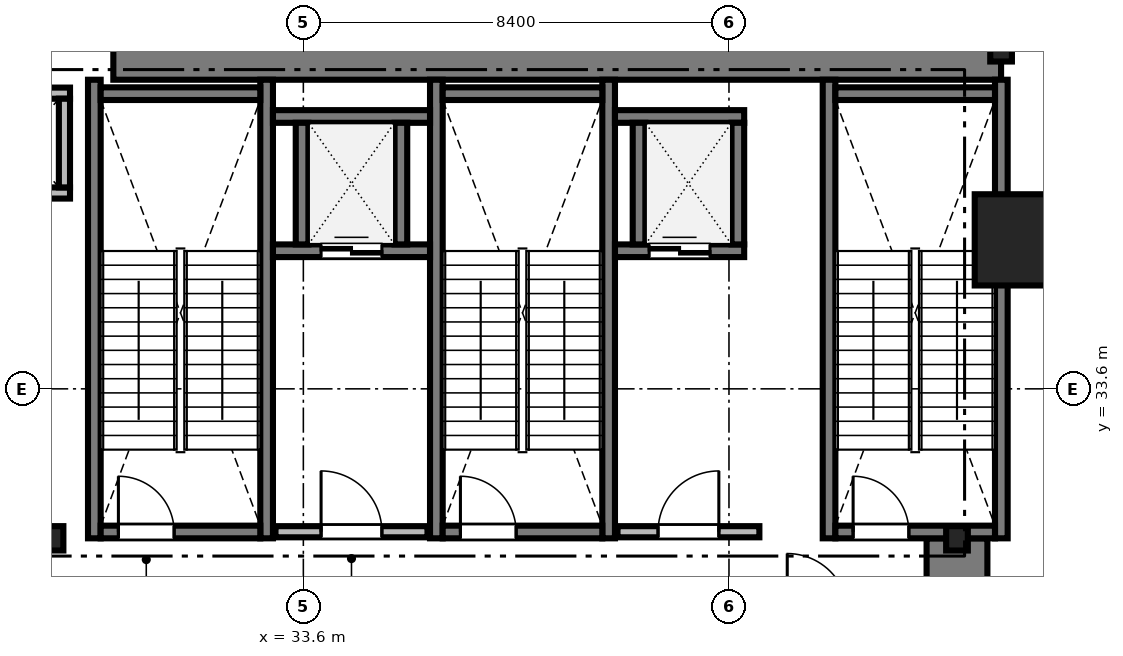
"""IFC4 building model, lengths in metres.
Left out: names, types, materials, properties, quantities, classifications, styles, units other than length and angle.
Written with IfcOpenShell. Run it as: python <this file> out.ifc"""

import sys

from ifc_helpers import new_model, si_unit, direction, frame, frame_2d, origin, origin_2d, place, context, subcontext, project, spatial, rectangle, i_section, extrude, source, transform, mapped, element, fill, save


model = new_model("IFC4")
c1 = context("Model", 3, precision=1e-05, world=origin(), true_north=direction((0.0, 1.0)))
c2 = subcontext(c1, "Body", "Model", "MODEL_VIEW")
j1 = project(units=[si_unit("LENGTHUNIT", "METRE"), si_unit("PLANEANGLEUNIT", "RADIAN")], contexts=[c1])
p1 = place(None, origin())
s1 = spatial("IfcSite", under=j1, at=p1, CompositionType="ELEMENT")
p2 = place(p1, origin())
s2 = spatial("IfcBuilding", under=s1, at=p2, CompositionType="ELEMENT")
p3 = place(p2, frame((0.0, 0.0, 17.0)))
s3 = spatial("IfcBuildingStorey", under=s2, at=p3, CompositionType="ELEMENT", Elevation=17.0)
m1 = source(origin(), c2, "Body", "SweptSolid", [
    extrude(rectangle(XDim=17.52, YDim=1.2, at=frame_2d((8.76, 0.0))), origin(), (0.0, 0.0, 1.0), 5.08),
])
p4 = place(p3, frame((29.85, 40.3, 0.0), z_axis=(0.0, 0.0, 1.0), x_axis=(1.0, 0.0, 0.0)))
e1 = element("IfcWall", 1, at=p4, inside=s3, PredefinedType="SHEAR", context=c2, shape_type="MappedRepresentation", body=[
    mapped(m1, transform((0.0, 0.0, 0.0), scale=1.0)),
])
m2 = source(origin(), c2, "Body", "SweptSolid", [
    extrude(rectangle(XDim=13.15, YDim=1.2, at=frame_2d((6.575, 0.0))), origin(), (0.0, 0.0, 1.0), 5.08),
])
p5 = place(p3, frame((46.5, 17.5, 0.0), z_axis=(0.0, 0.0, 1.0), x_axis=(0.0, 1.0, 0.0)))
e2 = element("IfcWall", 2, at=p5, inside=s3, PredefinedType="SHEAR", context=c2, shape_type="MappedRepresentation", body=[
    mapped(m2, transform((0.0, 0.0, 0.0), scale=1.0)),
])
m3 = source(origin(), c2, "Body", "SweptSolid", [
    extrude(i_section(OverallWidth=0.428, OverallDepth=0.481, WebThickness=0.04, FlangeThickness=0.063, FilletRadius=0.015, at=origin_2d()), origin(), (0.0, 0.0, 1.0), 5.08),
])
for number, where, z_axis, x_axis in (
    (3, (28.65, 30.65, 0.0), (0.0, 0.0, 1.0), (1.0, 0.0, 0.0)),
    (4, (46.5, 30.65, 0.0), (0.0, 0.0, 1.0), (1.0, 0.0, 0.0)),
    (5, (47.37, 40.3, 0.0), (0.0, 0.0, 1.0), (1.0, 0.0, 0.0)),
):
    element("IfcColumn", number, at=place(p3, frame(where, z_axis=z_axis, x_axis=x_axis)), inside=s3, PredefinedType="COLUMN", context=c2, shape_type="MappedRepresentation", body=[
        mapped(m3, transform((0.0, 0.0, 0.0), scale=1.0)),
    ])
m4 = source(origin(), c2, "Body", "SweptSolid", [
    extrude(rectangle(XDim=1.8, YDim=1.8, at=origin_2d()), origin(), (0.0, 0.0, 1.0), 5.08),
])
p6 = place(p3, frame((47.75, 36.54, 0.0), z_axis=(0.0, 0.0, 1.0), x_axis=(1.0, 0.0, 0.0)))
e6 = element("IfcColumn", 6, at=p6, inside=s3, PredefinedType="COLUMN", context=c2, shape_type="MappedRepresentation", body=[
    mapped(m4, transform((0.0, 0.0, 0.0), scale=1.0)),
])
m5 = source(origin(), c2, "Body", "SweptSolid", [
    extrude(rectangle(XDim=9.05, YDim=0.25, at=frame_2d((4.525, 0.0))), origin(), (0.0, 0.0, 1.0), 5.2),
])
for number, where, z_axis, x_axis in (
    (7, (29.475, 30.65, 0.0), (0.0, 0.0, 1.0), (0.0, 1.0, 0.0)),
    (8, (32.875, 30.65, 0.0), (0.0, 0.0, 1.0), (0.0, 1.0, 0.0)),
):
    element("IfcWall", number, at=place(p3, frame(where, z_axis=z_axis, x_axis=x_axis)), inside=s3, PredefinedType="SOLIDWALL", context=c2, shape_type="MappedRepresentation", body=[
        mapped(m5, transform((0.0, 0.0, 0.0), scale=1.0)),
    ])
m6 = source(origin(), c2, "Body", "SweptSolid", [
    extrude(rectangle(XDim=3.15, YDim=0.25, at=frame_2d((1.575, 0.0))), origin(), (0.0, 0.0, 1.0), 5.2),
])
p7 = place(p3, frame((29.6, 39.425, 0.0), z_axis=(0.0, 0.0, 1.0), x_axis=(1.0, 0.0, 0.0)))
e9 = element("IfcWall", 9, at=p7, inside=s3, PredefinedType="SOLIDWALL", context=c2, shape_type="MappedRepresentation", body=[
    mapped(m6, transform((0.0, 0.0, 0.0), scale=1.0)),
])
p8 = place(p3, frame((29.6, 30.775, 0.0), z_axis=(0.0, 0.0, 1.0), x_axis=(1.0, 0.0, 0.0)))
e10 = element("IfcWall", 10, at=p8, inside=s3, PredefinedType="SOLIDWALL", context=c2, shape_type="MappedRepresentation", body=[
    mapped(m6, transform((0.0, 0.0, 0.0), scale=1.0)),
])
m7 = source(origin(), c2, "Body", "SweptSolid", [
    extrude(rectangle(XDim=1.1, YDim=2.2, at=frame_2d((0.55, 1.1))), frame((0.0, 0.135, 0.0), z_axis=(0.0, -1.0, 0.0), x_axis=(1.0, 0.0, 0.0)), (0.0, 0.0, 1.0), 0.27),
])
p9 = place(p8, frame((0.35, 0.0, 0.0)))
e11 = element("IfcOpeningElement", 11, at=p9, cuts=e10, PredefinedType="OPENING", context=c2, shape_type="MappedRepresentation", body=[
    mapped(m7, transform((0.0, 0.0, 0.0), scale=1.0)),
])
for number, where, z_axis, x_axis in (
    (12, (36.225, 30.65, 0.0), (0.0, 0.0, 1.0), (0.0, 1.0, 0.0)),
    (13, (39.625, 30.65, 0.0), (0.0, 0.0, 1.0), (0.0, 1.0, 0.0)),
):
    element("IfcWall", number, at=place(p3, frame(where, z_axis=z_axis, x_axis=x_axis)), inside=s3, PredefinedType="SOLIDWALL", context=c2, shape_type="MappedRepresentation", body=[
        mapped(m5, transform((0.0, 0.0, 0.0), scale=1.0)),
    ])
p10 = place(p3, frame((36.35, 39.425, 0.0), z_axis=(0.0, 0.0, 1.0), x_axis=(1.0, 0.0, 0.0)))
e14 = element("IfcWall", 14, at=p10, inside=s3, PredefinedType="SOLIDWALL", context=c2, shape_type="MappedRepresentation", body=[
    mapped(m6, transform((0.0, 0.0, 0.0), scale=1.0)),
])
p11 = place(p3, frame((36.35, 30.775, 0.0), z_axis=(0.0, 0.0, 1.0), x_axis=(1.0, 0.0, 0.0)))
e15 = element("IfcWall", 15, at=p11, inside=s3, PredefinedType="SOLIDWALL", context=c2, shape_type="MappedRepresentation", body=[
    mapped(m6, transform((0.0, 0.0, 0.0), scale=1.0)),
])
p12 = place(p11, frame((0.35, 0.0, 0.0)))
e16 = element("IfcOpeningElement", 16, at=p12, cuts=e15, PredefinedType="OPENING", context=c2, shape_type="MappedRepresentation", body=[
    mapped(m7, transform((0.0, 0.0, 0.0), scale=1.0)),
])
for number, where, z_axis, x_axis in (
    (17, (43.975, 30.65, 0.0), (0.0, 0.0, 1.0), (0.0, 1.0, 0.0)),
    (18, (47.375, 30.65, 0.0), (0.0, 0.0, 1.0), (0.0, 1.0, 0.0)),
):
    element("IfcWall", number, at=place(p3, frame(where, z_axis=z_axis, x_axis=x_axis)), inside=s3, PredefinedType="SOLIDWALL", context=c2, shape_type="MappedRepresentation", body=[
        mapped(m5, transform((0.0, 0.0, 0.0), scale=1.0)),
    ])
p13 = place(p3, frame((44.1, 39.425, 0.0), z_axis=(0.0, 0.0, 1.0), x_axis=(1.0, 0.0, 0.0)))
e19 = element("IfcWall", 19, at=p13, inside=s3, PredefinedType="SOLIDWALL", context=c2, shape_type="MappedRepresentation", body=[
    mapped(m6, transform((0.0, 0.0, 0.0), scale=1.0)),
])
p14 = place(p3, frame((44.1, 30.775, 0.0), z_axis=(0.0, 0.0, 1.0), x_axis=(1.0, 0.0, 0.0)))
e20 = element("IfcWall", 20, at=p14, inside=s3, PredefinedType="SOLIDWALL", context=c2, shape_type="MappedRepresentation", body=[
    mapped(m6, transform((0.0, 0.0, 0.0), scale=1.0)),
])
p15 = place(p14, frame((0.35, 0.0, 0.0)))
e21 = element("IfcOpeningElement", 21, at=p15, cuts=e20, PredefinedType="OPENING", context=c2, shape_type="MappedRepresentation", body=[
    mapped(m7, transform((0.0, 0.0, 0.0), scale=1.0)),
])
m8 = source(origin(), c2, "Body", "SweptSolid", [
    extrude(rectangle(XDim=3.0, YDim=0.22, at=frame_2d((1.5, 0.0))), origin(), (0.0, 0.0, 1.0), 5.08),
])
p16 = place(p3, frame((33.05, 30.78, 0.0), z_axis=(0.0, 0.0, 1.0), x_axis=(1.0, 0.0, 0.0)))
e22 = element("IfcWall", 22, at=p16, inside=s3, PredefinedType="SOLIDWALL", context=c2, shape_type="MappedRepresentation", body=[
    mapped(m8, transform((0.0, 0.0, 0.0), scale=1.0)),
])
m9 = source(origin(), c2, "Body", "SweptSolid", [
    extrude(rectangle(XDim=1.2, YDim=2.2, at=frame_2d((0.6, 1.1))), frame((0.0, 0.12, 0.0), z_axis=(0.0, -1.0, 0.0), x_axis=(1.0, 0.0, 0.0)), (0.0, 0.0, 1.0), 0.24),
])
p17 = place(p16, frame((0.9, 0.0, 0.0)))
e23 = element("IfcOpeningElement", 23, at=p17, cuts=e22, PredefinedType="OPENING", context=c2, shape_type="MappedRepresentation", body=[
    mapped(m9, transform((0.0, 0.0, 0.0), scale=1.0)),
])
m10 = source(origin(), c2, "Body", "SweptSolid", [
    extrude(rectangle(XDim=2.8, YDim=0.22, at=frame_2d((1.4, 0.0))), origin(), (0.0, 0.0, 1.0), 5.08),
])
p18 = place(p3, frame((39.8, 30.78, 0.0), z_axis=(0.0, 0.0, 1.0), x_axis=(1.0, 0.0, 0.0)))
e24 = element("IfcWall", 24, at=p18, inside=s3, PredefinedType="SOLIDWALL", context=c2, shape_type="MappedRepresentation", body=[
    mapped(m10, transform((0.0, 0.0, 0.0), scale=1.0)),
])
p19 = place(p18, frame((0.8, 0.0, 0.0)))
e25 = element("IfcOpeningElement", 25, at=p19, cuts=e24, PredefinedType="OPENING", context=c2, shape_type="MappedRepresentation", body=[
    mapped(m9, transform((0.0, 0.0, 0.0), scale=1.0)),
])
m11 = source(origin(), c2, "Body", "SweptSolid", [
    extrude(rectangle(XDim=1.99, YDim=0.22, at=frame_2d((0.995, 0.0))), origin(), (0.0, 0.0, 1.0), 5.08),
])
for number, where, z_axis, x_axis in (
    (26, (27.005, 37.465, 0.0), (0.0, 0.0, 1.0), (1.0, 0.0, 0.0)),
    (27, (27.005, 39.435, 0.0), (0.0, 0.0, 1.0), (1.0, 0.0, 0.0)),
):
    element("IfcWall", number, at=place(p3, frame(where, z_axis=z_axis, x_axis=x_axis)), inside=s3, PredefinedType="SOLIDWALL", context=c2, shape_type="MappedRepresentation", body=[
        mapped(m11, transform((0.0, 0.0, 0.0), scale=1.0)),
    ])
m12 = source(origin(), c2, "Body", "SweptSolid", [
    extrude(rectangle(XDim=1.75, YDim=0.22, at=frame_2d((0.875, 0.0))), origin(), (0.0, 0.0, 1.0), 5.08),
])
p20 = place(p3, frame((28.885, 37.575, 0.0), z_axis=(0.0, 0.0, 1.0), x_axis=(0.0, 1.0, 0.0)))
e28 = element("IfcWall", 28, at=p20, inside=s3, PredefinedType="SOLIDWALL", context=c2, shape_type="MappedRepresentation", body=[
    mapped(m12, transform((0.0, 0.0, 0.0), scale=1.0)),
])
m13 = source(origin(), c2, "Body", "SweptSolid", [
    extrude(rectangle(XDim=3.1, YDim=0.25, at=frame_2d((1.55, 0.0))), origin(), (0.0, 0.0, 1.0), 5.08),
])
p21 = place(p3, frame((33.0, 36.325, 0.0), z_axis=(0.0, 0.0, 1.0), x_axis=(1.0, 0.0, 0.0)))
e29 = element("IfcWall", 29, at=p21, inside=s3, PredefinedType="SOLIDWALL", context=c2, shape_type="MappedRepresentation", body=[
    mapped(m13, transform((0.0, 0.0, 0.0), scale=1.0)),
])
m14 = source(origin(), c2, "Body", "SweptSolid", [
    extrude(rectangle(XDim=1.2, YDim=2.25, at=frame_2d((0.6, 1.125))), frame((0.0, 0.135, 0.0), z_axis=(0.0, -1.0, 0.0), x_axis=(1.0, 0.0, 0.0)), (0.0, 0.0, 1.0), 0.27),
])
p22 = place(p21, frame((0.95, 0.0, 0.0)))
e30 = element("IfcOpeningElement", 30, at=p22, cuts=e29, PredefinedType="OPENING", context=c2, shape_type="MappedRepresentation", body=[
    mapped(m14, transform((0.0, 0.0, 0.0), scale=1.0)),
])
p23 = place(p3, frame((33.0, 38.975, 0.0), z_axis=(0.0, 0.0, 1.0), x_axis=(1.0, 0.0, 0.0)))
e31 = element("IfcWall", 31, at=p23, inside=s3, PredefinedType="SOLIDWALL", context=c2, shape_type="MappedRepresentation", body=[
    mapped(m13, transform((0.0, 0.0, 0.0), scale=1.0)),
])
m15 = source(origin(), c2, "Body", "SweptSolid", [
    extrude(rectangle(XDim=2.4, YDim=0.25, at=frame_2d((1.2, 0.0))), origin(), (0.0, 0.0, 1.0), 5.08),
])
for number, where, z_axis, x_axis in (
    (32, (33.575, 36.45, 0.0), (0.0, 0.0, 1.0), (0.0, 1.0, 0.0)),
    (33, (35.525, 36.45, 0.0), (0.0, 0.0, 1.0), (0.0, 1.0, 0.0)),
):
    element("IfcWall", number, at=place(p3, frame(where, z_axis=z_axis, x_axis=x_axis)), inside=s3, PredefinedType="SOLIDWALL", context=c2, shape_type="MappedRepresentation", body=[
        mapped(m15, transform((0.0, 0.0, 0.0), scale=1.0)),
    ])
m16 = source(origin(), c2, "Body", "SweptSolid", [
    extrude(rectangle(XDim=2.55, YDim=0.25, at=frame_2d((1.275, 0.0))), origin(), (0.0, 0.0, 1.0), 5.08),
])
p24 = place(p3, frame((39.75, 36.325, 0.0), z_axis=(0.0, 0.0, 1.0), x_axis=(1.0, 0.0, 0.0)))
e34 = element("IfcWall", 34, at=p24, inside=s3, PredefinedType="SOLIDWALL", context=c2, shape_type="MappedRepresentation", body=[
    mapped(m16, transform((0.0, 0.0, 0.0), scale=1.0)),
])
p25 = place(p24, frame((0.675, 0.0, 0.0)))
e35 = element("IfcOpeningElement", 35, at=p25, cuts=e34, PredefinedType="OPENING", context=c2, shape_type="MappedRepresentation", body=[
    mapped(m14, transform((0.0, 0.0, 0.0), scale=1.0)),
])
p26 = place(p3, frame((39.75, 38.975, 0.0), z_axis=(0.0, 0.0, 1.0), x_axis=(1.0, 0.0, 0.0)))
e36 = element("IfcWall", 36, at=p26, inside=s3, PredefinedType="SOLIDWALL", context=c2, shape_type="MappedRepresentation", body=[
    mapped(m16, transform((0.0, 0.0, 0.0), scale=1.0)),
])
for number, where, z_axis, x_axis in (
    (37, (40.225, 36.45, 0.0), (0.0, 0.0, 1.0), (0.0, 1.0, 0.0)),
    (38, (42.175, 36.45, 0.0), (0.0, 0.0, 1.0), (0.0, 1.0, 0.0)),
):
    element("IfcWall", number, at=place(p3, frame(where, z_axis=z_axis, x_axis=x_axis)), inside=s3, PredefinedType="SOLIDWALL", context=c2, shape_type="MappedRepresentation", body=[
        mapped(m15, transform((0.0, 0.0, 0.0), scale=1.0)),
    ])
m17 = source(origin(), c2, "Body", "SweptSolid", [
    extrude(rectangle(XDim=1.1, YDim=2.2, at=frame_2d((0.55, 1.1))), frame((0.0, 0.025, 0.0), z_axis=(0.0, -1.0, 0.0), x_axis=(1.0, 0.0, 0.0)), (0.0, 0.0, 1.0), 0.05),
])
p27 = place(p9, origin())
e39 = element("IfcDoor", 39, at=p27, inside=s3, OperationType="SINGLE_SWING_LEFT", PredefinedType="DOOR", context=c2, shape_type="MappedRepresentation", body=[
    mapped(m17, transform((0.0, 0.0, 0.0), scale=1.0)),
])
fill(e11, e39)
p28 = place(p12, origin())
e40 = element("IfcDoor", 40, at=p28, inside=s3, OperationType="SINGLE_SWING_LEFT", PredefinedType="DOOR", context=c2, shape_type="MappedRepresentation", body=[
    mapped(m17, transform((0.0, 0.0, 0.0), scale=1.0)),
])
fill(e16, e40)
p29 = place(p15, origin())
e41 = element("IfcDoor", 41, at=p29, inside=s3, OperationType="SINGLE_SWING_LEFT", PredefinedType="DOOR", context=c2, shape_type="MappedRepresentation", body=[
    mapped(m17, transform((0.0, 0.0, 0.0), scale=1.0)),
])
fill(e21, e41)
m18 = source(origin(), c2, "Body", "SweptSolid", [
    extrude(rectangle(XDim=1.2, YDim=2.2, at=frame_2d((0.6, 1.1))), frame((0.0, 0.025, 0.0), z_axis=(0.0, -1.0, 0.0), x_axis=(1.0, 0.0, 0.0)), (0.0, 0.0, 1.0), 0.05),
])
p30 = place(p17, origin())
e42 = element("IfcDoor", 42, at=p30, inside=s3, OperationType="SINGLE_SWING_LEFT", PredefinedType="DOOR", context=c2, shape_type="MappedRepresentation", body=[
    mapped(m18, transform((0.0, 0.0, 0.0), scale=1.0)),
])
fill(e23, e42)
p31 = place(p19, origin())
e43 = element("IfcDoor", 43, at=p31, inside=s3, OperationType="SINGLE_SWING_RIGHT", PredefinedType="DOOR", context=c2, shape_type="MappedRepresentation", body=[
    mapped(m18, transform((0.0, 0.0, 0.0), scale=1.0)),
])
fill(e25, e43)
m19 = source(origin(), c2, "Body", "SweptSolid", [
    extrude(rectangle(XDim=1.2, YDim=2.25, at=frame_2d((0.6, 1.125))), frame((0.0, 0.025, 0.0), z_axis=(0.0, -1.0, 0.0), x_axis=(1.0, 0.0, 0.0)), (0.0, 0.0, 1.0), 0.05),
])
p32 = place(p22, origin())
e44 = element("IfcDoor", 44, at=p32, inside=s3, OperationType="DOUBLE_DOOR_SLIDING", PredefinedType="DOOR", context=c2, shape_type="MappedRepresentation", body=[
    mapped(m19, transform((0.0, 0.0, 0.0), scale=1.0)),
])
fill(e30, e44)
p33 = place(p25, origin())
e45 = element("IfcDoor", 45, at=p33, inside=s3, OperationType="DOUBLE_DOOR_SLIDING", PredefinedType="DOOR", context=c2, shape_type="MappedRepresentation", body=[
    mapped(m19, transform((0.0, 0.0, 0.0), scale=1.0)),
])
fill(e35, e45)
save(model, sys.argv[1])
